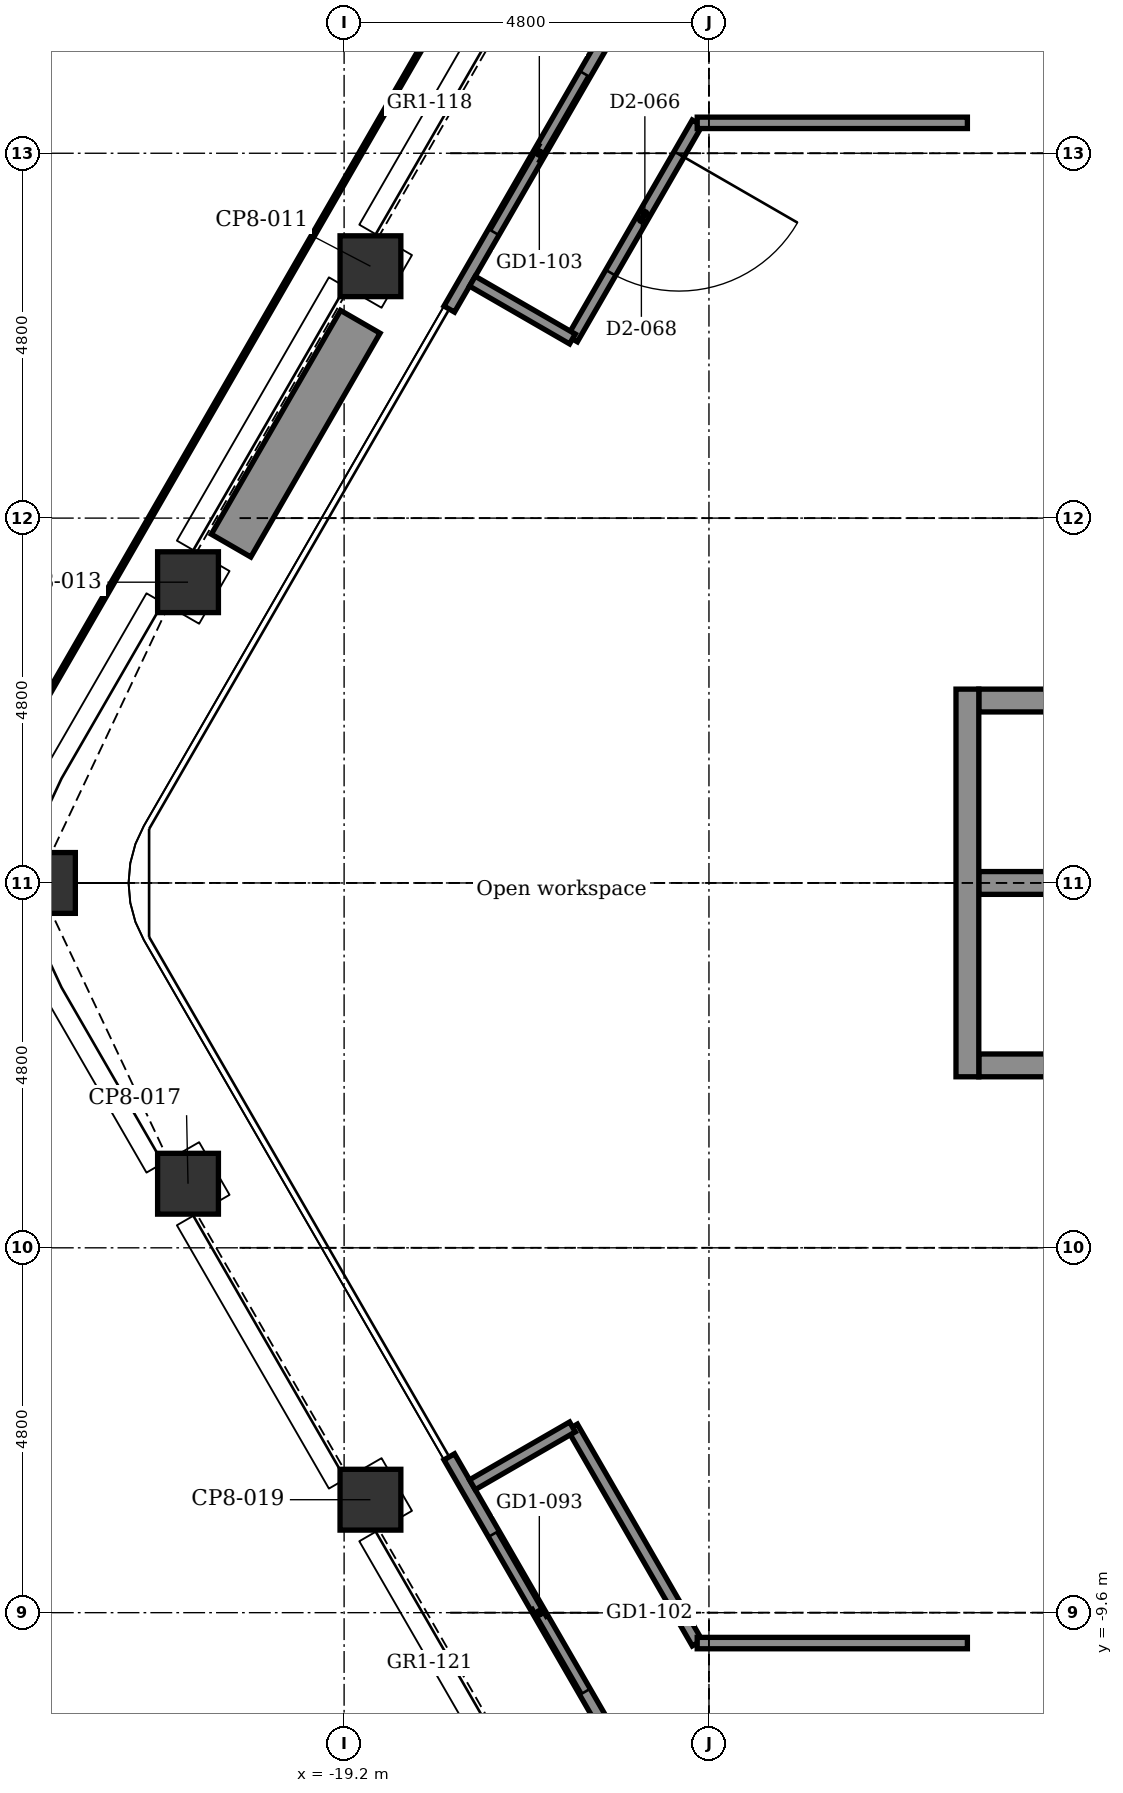
"""IFC4 building model, lengths in metres.
Left out: names, types, materials, properties, quantities, classifications, styles, units other than length and angle.
Written with IfcOpenShell. Run it as: python <this file> out.ifc"""

import sys

from ifc_helpers import new_model, si_unit, direction, frame, frame_2d, origin, origin_2d, place, context, subcontext, project, spatial, rectangle, extrude, element, fill, save


model = new_model("IFC4")
c1 = context("Model", 3, precision=1e-05, world=origin(), true_north=direction((0.0, 1.0)))
c2 = subcontext(c1, "Body", "Model", "MODEL_VIEW")
j1 = project(units=[si_unit("LENGTHUNIT", "METRE"), si_unit("PLANEANGLEUNIT", "RADIAN")], contexts=[c1])
p1 = place(None, origin())
s1 = spatial("IfcSite", under=j1, at=p1, CompositionType="ELEMENT")
p2 = place(p1, origin())
s2 = spatial("IfcBuilding", under=s1, at=p2, CompositionType="ELEMENT")
p3 = place(p2, frame((0.0, 0.0, 226.7)))
s3 = spatial("IfcBuildingStorey", under=s2, at=p3, CompositionType="ELEMENT", Elevation=226.7)
for number, where, z_axis, x_axis in (
    (1, (-18.854, -8.114, -0.15), (0.0, 0.0, 1.0), (0.866, 0.5, 0.0)),
    (2, (-21.254, -3.957, -0.15), (0.0, 0.0, 1.0), (0.866, 0.5, 0.0)),
    (3, (-23.136, 0.0, -0.15), (0.0, 0.0, 1.0), (1.0, 0.0, 0.0)),
    (4, (-21.254, 3.957, -0.15), (0.0, 0.0, 1.0), (0.5, 0.866, 0.0)),
    (5, (-18.854, 8.114, -0.15), (0.0, 0.0, 1.0), (0.5, 0.866, 0.0)),
):
    element("IfcColumn", number, at=place(p3, frame(where, z_axis=z_axis, x_axis=x_axis)), inside=s3, PredefinedType="COLUMN", context=c2, shape_type="SweptSolid", body=[
        extrude(rectangle(XDim=0.8, YDim=0.8, at=origin_2d()), origin(), (0.0, 0.0, 1.0), 3.9),
    ])
p4 = place(p3, frame((-10.85, -2.4, -0.15), z_axis=(0.0, 0.0, 1.0), x_axis=(1.0, 0.0, 0.0)))
e6 = element("IfcWall", 6, at=p4, inside=s3, PredefinedType="STANDARD", context=c2, shape_type="SweptSolid", body=[
    extrude(rectangle(XDim=1.1, YDim=0.3, at=frame_2d((0.55, 0.0))), origin(), (0.0, 0.0, 1.0), 3.9),
])
p5 = place(p3, frame((-10.85, 0.0, -0.15), z_axis=(0.0, 0.0, 1.0), x_axis=(1.0, 0.0, 0.0)))
e7 = element("IfcWall", 7, at=p5, inside=s3, PredefinedType="STANDARD", context=c2, shape_type="SweptSolid", body=[
    extrude(rectangle(XDim=3.3, YDim=0.3, at=frame_2d((1.65, 0.0))), origin(), (0.0, 0.0, 1.0), 3.9),
])
p6 = place(p3, frame((-10.85, 2.4, -0.15), z_axis=(0.0, 0.0, 1.0), x_axis=(1.0, 0.0, 0.0)))
e8 = element("IfcWall", 8, at=p6, inside=s3, PredefinedType="STANDARD", context=c2, shape_type="SweptSolid", body=[
    extrude(rectangle(XDim=1.1, YDim=0.3, at=frame_2d((0.55, 0.0))), origin(), (0.0, 0.0, 1.0), 3.9),
])
p7 = place(p3, frame((-11.0, -2.55, -0.15), z_axis=(0.0, 0.0, 1.0), x_axis=(0.0, 1.0, 0.0)))
e9 = element("IfcWall", 9, at=p7, inside=s3, PredefinedType="STANDARD", context=c2, shape_type="SweptSolid", body=[
    extrude(rectangle(XDim=5.1, YDim=0.3, at=frame_2d((2.55, 0.0))), origin(), (0.0, 0.0, 1.0), 3.9),
])
p8 = place(p3, frame((-15.447, -11.655, 0.0), z_axis=(0.0, 0.0, 1.0), x_axis=(-0.499978080042, 0.866038058908, 0.0)))
e10 = element("IfcWall", 10, at=p8, inside=s3, PredefinedType="PARTITIONING", context=c2, shape_type="SweptSolid", body=[
    extrude(rectangle(XDim=4.74, YDim=0.16, at=frame_2d((2.37, 0.0))), origin(), (0.0, 0.0, 1.0), 3.75),
])
p9 = place(p8, frame((1.17, 0.0, 0.0)))
e11 = element("IfcOpeningElement", 11, at=p9, cuts=e10, PredefinedType="OPENING", context=c2, shape_type="SweptSolid", body=[
    extrude(rectangle(XDim=2.4, YDim=2.4, at=frame_2d((1.2, 1.2))), frame((0.0, 0.09, 0.0), z_axis=(0.0, -1.0, 0.0), x_axis=(1.0, 0.0, 0.0)), (0.0, 0.0, 1.0), 0.18),
])
p10 = place(p3, frame((-17.817, 7.55, 0.0), z_axis=(0.0, 0.0, 1.0), x_axis=(0.499978080042, 0.866038058908, 0.0)))
e12 = element("IfcWall", 12, at=p10, inside=s3, PredefinedType="PARTITIONING", context=c2, shape_type="SweptSolid", body=[
    extrude(rectangle(XDim=4.74, YDim=0.16, at=frame_2d((2.37, 0.0))), origin(), (0.0, 0.0, 1.0), 3.75),
])
p11 = place(p10, frame((1.17, 0.0, 0.0)))
e13 = element("IfcOpeningElement", 13, at=p11, cuts=e12, PredefinedType="OPENING", context=c2, shape_type="SweptSolid", body=[
    extrude(rectangle(XDim=2.4, YDim=2.4, at=frame_2d((1.2, 1.2))), frame((0.0, 0.09, 0.0), z_axis=(0.0, -1.0, 0.0), x_axis=(1.0, 0.0, 0.0)), (0.0, 0.0, 1.0), 0.18),
])
p12 = place(p3, frame((-20.687, 4.438, 0.0), z_axis=(0.0, 0.0, 1.0), x_axis=(0.500008388397, 0.866020560687, 0.0)))
e14 = element("IfcWall", 14, at=p12, inside=s3, PredefinedType="USERDEFINED", context=c2, shape_type="SweptSolid", body=[
    extrude(rectangle(XDim=3.4, YDim=0.6, at=frame_2d((1.7, 0.0))), origin(), (0.0, 0.0, 1.0), 0.7),
])
p13 = place(p3, frame((-16.196, -7.157, 0.0), z_axis=(0.0, 0.0, 1.0), x_axis=(0.499954196102, -0.866051847062, 0.0)))
e15 = element("IfcWall", 15, at=p13, inside=s3, PredefinedType="PARTITIONING", context=c2, shape_type="SweptSolid", body=[
    extrude(rectangle(XDim=3.283, YDim=0.15, at=frame_2d((1.642, 0.0))), origin(), (0.0, 0.0, 1.0), 3.75),
])
p14 = place(p3, frame((-16.196, 7.157, 0.0), z_axis=(0.0, 0.0, 1.0), x_axis=(0.499954196102, 0.866051847062, 0.0)))
e16 = element("IfcWall", 16, at=p14, inside=s3, PredefinedType="PARTITIONING", context=c2, shape_type="SweptSolid", body=[
    extrude(rectangle(XDim=3.283, YDim=0.15, at=frame_2d((1.642, 0.0))), origin(), (0.0, 0.0, 1.0), 3.75),
])
p15 = place(p14, frame((1.006, 0.0, 0.0)))
e17 = element("IfcOpeningElement", 17, at=p15, cuts=e16, PredefinedType="OPENING", context=c2, shape_type="SweptSolid", body=[
    extrude(rectangle(XDim=1.8, YDim=2.1, at=frame_2d((0.9, 1.05))), frame((0.0, 0.085, 0.0), z_axis=(0.0, -1.0, 0.0), x_axis=(1.0, 0.0, 0.0)), (0.0, 0.0, 1.0), 0.17),
])
for number, where, z_axis, x_axis in (
    (18, (-17.512, 7.917, 0.0), (0.0, 0.0, 1.0), (0.866, -0.5, 0.0)),
    (19, (-17.512, -7.917, 0.0), (0.0, 0.0, 1.0), (0.866, 0.5, 0.0)),
):
    element("IfcWall", number, at=place(p3, frame(where, z_axis=z_axis, x_axis=x_axis)), inside=s3, PredefinedType="PARTITIONING", context=c2, shape_type="SweptSolid", body=[
        extrude(rectangle(XDim=1.52, YDim=0.15, at=frame_2d((0.76, 0.0))), origin(), (0.0, 0.0, 1.0), 3.75),
    ])
for number, where, z_axis, x_axis in (
    (20, (-14.555, -10.0, 0.0), (0.0, 0.0, 1.0), (1.0, 0.0, 0.0)),
    (21, (-14.555, 10.0, 0.0), (0.0, 0.0, 1.0), (1.0, 0.0, 0.0)),
):
    element("IfcWall", number, at=place(p3, frame(where, z_axis=z_axis, x_axis=x_axis)), inside=s3, PredefinedType="PARTITIONING", context=c2, shape_type="SweptSolid", body=[
        extrude(rectangle(XDim=3.555, YDim=0.15, at=frame_2d((1.777, 0.0))), origin(), (0.0, 0.0, 1.0), 3.75),
    ])
p16 = place(p9, origin())
e22 = element("IfcDoor", 22, at=p16, inside=s3, OperationType="DOUBLE_DOOR_SLIDING", PredefinedType="DOOR", context=c2, shape_type="SweptSolid", body=[
    extrude(rectangle(XDim=2.4, YDim=2.4, at=frame_2d((1.2, 1.2))), frame((0.0, 0.025, 0.0), z_axis=(0.0, -1.0, 0.0), x_axis=(1.0, 0.0, 0.0)), (0.0, 0.0, 1.0), 0.05),
])
fill(e11, e22)
p17 = place(p11, origin())
e23 = element("IfcDoor", 23, at=p17, inside=s3, OperationType="DOUBLE_DOOR_SLIDING", PredefinedType="DOOR", context=c2, shape_type="SweptSolid", body=[
    extrude(rectangle(XDim=2.4, YDim=2.4, at=frame_2d((1.2, 1.2))), frame((0.0, 0.025, 0.0), z_axis=(0.0, -1.0, 0.0), x_axis=(1.0, 0.0, 0.0)), (0.0, 0.0, 1.0), 0.05),
])
fill(e13, e23)
p18 = place(p15, frame((1.8, 0.0, 0.0), z_axis=(0.0, 0.0, 1.0), x_axis=(-1.0, 0.0, 0.0)))
e24 = element("IfcDoor", 24, at=p18, inside=s3, OperationType="SINGLE_SWING_RIGHT", PredefinedType="DOOR", context=c2, shape_type="SweptSolid", body=[
    extrude(rectangle(XDim=1.8, YDim=2.1, at=frame_2d((0.9, 1.05))), frame((0.0, 0.025, 0.0), z_axis=(0.0, -1.0, 0.0), x_axis=(1.0, 0.0, 0.0)), (0.0, 0.0, 1.0), 0.05),
])
fill(e17, e24)
save(model, sys.argv[1])
